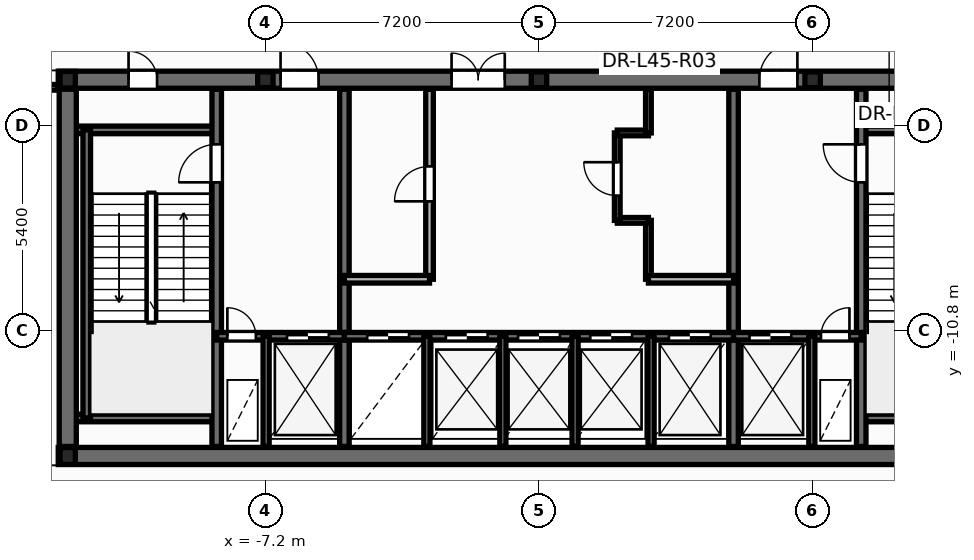
"""IFC4 building model, lengths in metres.
Left out: names, types, materials, properties, quantities, classifications, styles, units other than length and angle.
Written with IfcOpenShell. Run it as: python <this file> out.ifc"""

import sys

from ifc_helpers import new_model, si_unit, direction, frame, frame_2d, origin, origin_2d, place, context, subcontext, project, spatial, rectangle, i_section, extrude, element, fill, save


model = new_model("IFC4")
c1 = context("Model", 3, precision=1e-05, world=origin(), true_north=direction((0.0, 1.0)))
c2 = subcontext(c1, "Body", "Model", "MODEL_VIEW")
j1 = project(units=[si_unit("LENGTHUNIT", "METRE"), si_unit("PLANEANGLEUNIT", "RADIAN")], contexts=[c1])
p1 = place(None, origin())
s1 = spatial("IfcSite", under=j1, at=p1, CompositionType="ELEMENT")
p2 = place(p1, origin())
s2 = spatial("IfcBuilding", under=s1, at=p2, CompositionType="ELEMENT")
p3 = place(p2, frame((0.0, 0.0, 173.7)))
s3 = spatial("IfcBuildingStorey", under=s2, at=p3, CompositionType="ELEMENT", Elevation=173.7)
for number, where, z_axis, x_axis in (
    (1, (-12.4, -14.1, 0.0), (0.0, 0.0, 1.0), (1.0, 0.0, 0.0)),
    (2, (-12.4, -4.2, 0.0), (0.0, 0.0, 1.0), (1.0, 0.0, 0.0)),
):
    element("IfcColumn", number, at=place(p3, frame(where, z_axis=z_axis, x_axis=x_axis)), inside=s3, PredefinedType="COLUMN", context=c2, shape_type="SweptSolid", body=[
        extrude(i_section(OverallWidth=0.4, OverallDepth=0.44, WebThickness=0.028, FlangeThickness=0.04, at=origin_2d()), origin(), (0.0, 0.0, 1.0), 4.8),
    ])
for number, where, z_axis, x_axis in (
    (3, (-7.2, -4.2, 0.0), (0.0, 0.0, 1.0), (1.0, 0.0, 0.0)),
    (4, (0.0, -4.2, 0.0), (0.0, 0.0, 1.0), (1.0, 0.0, 0.0)),
    (5, (7.2, -4.2, 0.0), (0.0, 0.0, 1.0), (1.0, 0.0, 0.0)),
):
    element("IfcColumn", number, at=place(p3, frame(where, z_axis=z_axis, x_axis=x_axis)), inside=s3, PredefinedType="PILASTER", context=c2, shape_type="SweptSolid", body=[
        extrude(i_section(OverallWidth=0.405, OverallDepth=0.414, WebThickness=0.022, FlangeThickness=0.032, at=origin_2d()), origin(), (0.0, 0.0, 1.0), 4.8),
    ])
p4 = place(p3, frame((2.88, -9.45, 0.0), z_axis=(0.0, 0.0, 1.0), x_axis=(0.0, 1.0, 0.0)))
e6 = element("IfcWall", 6, at=p4, inside=s3, PredefinedType="PARTITIONING", context=c2, shape_type="SweptSolid", body=[
    extrude(rectangle(XDim=1.55, YDim=0.15, at=frame_2d((0.775, 0.0))), origin(), (0.0, 0.0, 1.0), 4.55),
])
p5 = place(p3, frame((2.06, -7.9, 0.0), z_axis=(0.0, 0.0, 1.0), x_axis=(1.0, 0.0, 0.0)))
e7 = element("IfcWall", 7, at=p5, inside=s3, PredefinedType="PARTITIONING", context=c2, shape_type="SweptSolid", body=[
    extrude(rectangle(XDim=0.82, YDim=0.15, at=frame_2d((0.41, 0.0))), origin(), (0.0, 0.0, 1.0), 4.55),
])
p6 = place(p3, frame((2.06, -7.9, 0.0), z_axis=(0.0, 0.0, 1.0), x_axis=(0.0, 1.0, 0.0)))
e8 = element("IfcWall", 8, at=p6, inside=s3, PredefinedType="PARTITIONING", context=c2, shape_type="SweptSolid", body=[
    extrude(rectangle(XDim=2.3, YDim=0.15, at=frame_2d((1.15, 0.0))), origin(), (0.0, 0.0, 1.0), 4.55),
])
p7 = place(p6, frame((0.65, 0.0, 0.0)))
e9 = element("IfcOpeningElement", 9, at=p7, cuts=e8, PredefinedType="OPENING", context=c2, shape_type="SweptSolid", body=[
    extrude(rectangle(XDim=0.886, YDim=2.104, at=frame_2d((0.44, 1.052))), frame((0.0, 0.085, 0.0), z_axis=(0.0, -1.0, 0.0), x_axis=(1.0, 0.0, 0.0)), (0.0, 0.0, 1.0), 0.17),
])
p8 = place(p3, frame((2.06, -5.6, 0.0), z_axis=(0.0, 0.0, 1.0), x_axis=(1.0, 0.0, 0.0)))
e10 = element("IfcWall", 10, at=p8, inside=s3, PredefinedType="PARTITIONING", context=c2, shape_type="SweptSolid", body=[
    extrude(rectangle(XDim=0.82, YDim=0.15, at=frame_2d((0.41, 0.0))), origin(), (0.0, 0.0, 1.0), 4.55),
])
p9 = place(p3, frame((2.88, -5.6, 0.0), z_axis=(0.0, 0.0, 1.0), x_axis=(0.0, 1.0, 0.0)))
e11 = element("IfcWall", 11, at=p9, inside=s3, PredefinedType="PARTITIONING", context=c2, shape_type="SweptSolid", body=[
    extrude(rectangle(XDim=1.15, YDim=0.15, at=frame_2d((0.575, 0.0))), origin(), (0.0, 0.0, 1.0), 4.55),
])
p10 = place(p3, frame((-12.65, -14.1, 0.0), z_axis=(0.0, 0.0, 1.0), x_axis=(1.0, 0.0, 0.0)))
e12 = element("IfcWall", 12, at=p10, inside=s3, PredefinedType="SHEAR", context=c2, shape_type="SweptSolid", body=[
    extrude(rectangle(XDim=25.3, YDim=0.45, at=frame_2d((12.65, 0.0))), origin(), (0.0, 0.0, 1.0), 4.8),
])
p11 = place(p3, frame((-12.65, -4.2, 0.0), z_axis=(0.0, 0.0, 1.0), x_axis=(1.0, 0.0, 0.0)))
e13 = element("IfcWall", 13, at=p11, inside=s3, PredefinedType="SHEAR", context=c2, shape_type="SweptSolid", body=[
    extrude(rectangle(XDim=25.3, YDim=0.45, at=frame_2d((12.65, 0.0))), origin(), (0.0, 0.0, 1.0), 4.8),
])
p12 = place(p11, frame((1.85, 0.0, 0.0)))
e14 = element("IfcOpeningElement", 14, at=p12, cuts=e13, PredefinedType="OPENING", context=c2, shape_type="SweptSolid", body=[
    extrude(rectangle(XDim=0.756, YDim=2.054, at=frame_2d((0.375, 1.027))), frame((0.0, 0.235, 0.0), z_axis=(0.0, -1.0, 0.0), x_axis=(1.0, 0.0, 0.0)), (0.0, 0.0, 1.0), 0.47),
])
p13 = place(p11, frame((22.65, 0.0, 0.0)))
e15 = element("IfcOpeningElement", 15, at=p13, cuts=e13, PredefinedType="OPENING", context=c2, shape_type="SweptSolid", body=[
    extrude(rectangle(XDim=0.756, YDim=2.054, at=frame_2d((0.375, 1.027))), frame((0.0, 0.235, 0.0), z_axis=(0.0, -1.0, 0.0), x_axis=(1.0, 0.0, 0.0)), (0.0, 0.0, 1.0), 0.47),
])
p14 = place(p11, frame((5.85, 0.0, 0.0)))
e16 = element("IfcOpeningElement", 16, at=p14, cuts=e13, PredefinedType="OPENING", context=c2, shape_type="SweptSolid", body=[
    extrude(rectangle(XDim=1.006, YDim=2.104, at=frame_2d((0.5, 1.052))), frame((0.0, 0.235, 0.0), z_axis=(0.0, -1.0, 0.0), x_axis=(1.0, 0.0, 0.0)), (0.0, 0.0, 1.0), 0.47),
])
p15 = place(p11, frame((10.35, 0.0, 0.0)))
e17 = element("IfcOpeningElement", 17, at=p15, cuts=e13, PredefinedType="OPENING", context=c2, shape_type="SweptSolid", body=[
    extrude(rectangle(XDim=1.406, YDim=2.154, at=frame_2d((0.7, 1.077))), frame((0.0, 0.235, 0.0), z_axis=(0.0, -1.0, 0.0), x_axis=(1.0, 0.0, 0.0)), (0.0, 0.0, 1.0), 0.47),
])
p16 = place(p11, frame((18.45, 0.0, 0.0)))
e18 = element("IfcOpeningElement", 18, at=p16, cuts=e13, PredefinedType="OPENING", context=c2, shape_type="SweptSolid", body=[
    extrude(rectangle(XDim=1.006, YDim=2.104, at=frame_2d((0.5, 1.052))), frame((0.0, 0.235, 0.0), z_axis=(0.0, -1.0, 0.0), x_axis=(1.0, 0.0, 0.0)), (0.0, 0.0, 1.0), 0.47),
])
for number, where, z_axis, x_axis in (
    (19, (-12.35, -5.52, 0.0), (0.0, 0.0, 1.0), (1.0, 0.0, 0.0)),
    (20, (-12.35, -13.1, 0.0), (0.0, 0.0, 1.0), (1.0, 0.0, 0.0)),
):
    element("IfcWall", number, at=place(p3, frame(where, z_axis=z_axis, x_axis=x_axis)), inside=s3, PredefinedType="SOLIDWALL", context=c2, shape_type="SweptSolid", body=[
        extrude(rectangle(XDim=3.87, YDim=0.2, at=frame_2d((1.935, 0.0))), origin(), (0.0, 0.0, 1.0), 4.8),
    ])
p17 = place(p3, frame((-11.9, -13.1, 0.0), z_axis=(0.0, 0.0, 1.0), x_axis=(0.0, 1.0, 0.0)))
e21 = element("IfcWall", 21, at=p17, inside=s3, PredefinedType="SOLIDWALL", context=c2, shape_type="SweptSolid", body=[
    extrude(rectangle(XDim=7.58, YDim=0.2, at=frame_2d((3.79, 0.0))), origin(), (0.0, 0.0, 1.0), 4.8),
])
for number, where, z_axis, x_axis in (
    (22, (8.48, -5.52, 0.0), (0.0, 0.0, 1.0), (1.0, 0.0, 0.0)),
    (23, (8.48, -13.1, 0.0), (0.0, 0.0, 1.0), (1.0, 0.0, 0.0)),
):
    element("IfcWall", number, at=place(p3, frame(where, z_axis=z_axis, x_axis=x_axis)), inside=s3, PredefinedType="SOLIDWALL", context=c2, shape_type="SweptSolid", body=[
        extrude(rectangle(XDim=3.87, YDim=0.2, at=frame_2d((1.935, 0.0))), origin(), (0.0, 0.0, 1.0), 4.8),
    ])
p18 = place(p3, frame((-8.48, -13.85, 0.0), z_axis=(0.0, 0.0, 1.0), x_axis=(0.0, 1.0, 0.0)))
e24 = element("IfcWall", 24, at=p18, inside=s3, PredefinedType="SHEAR", context=c2, shape_type="SweptSolid", body=[
    extrude(rectangle(XDim=9.4, YDim=0.25, at=frame_2d((4.7, 0.0))), origin(), (0.0, 0.0, 1.0), 4.8),
])
p19 = place(p18, frame((6.95, 0.0, 0.0)))
e25 = element("IfcOpeningElement", 25, at=p19, cuts=e24, PredefinedType="OPENING", context=c2, shape_type="SweptSolid", body=[
    extrude(rectangle(XDim=1.006, YDim=2.104, at=frame_2d((0.5, 1.052))), frame((0.0, 0.135, 0.0), z_axis=(0.0, -1.0, 0.0), x_axis=(1.0, 0.0, 0.0)), (0.0, 0.0, 1.0), 0.27),
])
p20 = place(p3, frame((8.48, -13.85, 0.0), z_axis=(0.0, 0.0, 1.0), x_axis=(0.0, 1.0, 0.0)))
e26 = element("IfcWall", 26, at=p20, inside=s3, PredefinedType="SHEAR", context=c2, shape_type="SweptSolid", body=[
    extrude(rectangle(XDim=9.4, YDim=0.25, at=frame_2d((4.7, 0.0))), origin(), (0.0, 0.0, 1.0), 4.8),
])
p21 = place(p20, frame((6.95, 0.0, 0.0)))
e27 = element("IfcOpeningElement", 27, at=p21, cuts=e26, PredefinedType="OPENING", context=c2, shape_type="SweptSolid", body=[
    extrude(rectangle(XDim=1.006, YDim=2.104, at=frame_2d((0.5, 1.052))), frame((0.0, 0.135, 0.0), z_axis=(0.0, -1.0, 0.0), x_axis=(1.0, 0.0, 0.0)), (0.0, 0.0, 1.0), 0.27),
])
for number, where, z_axis, x_axis in (
    (28, (-5.12, -13.85, 0.0), (0.0, 0.0, 1.0), (0.0, 1.0, 0.0)),
    (29, (5.12, -13.85, 0.0), (0.0, 0.0, 1.0), (0.0, 1.0, 0.0)),
):
    element("IfcWall", number, at=place(p3, frame(where, z_axis=z_axis, x_axis=x_axis)), inside=s3, PredefinedType="SHEAR", context=c2, shape_type="SweptSolid", body=[
        extrude(rectangle(XDim=9.4, YDim=0.25, at=frame_2d((4.7, 0.0))), origin(), (0.0, 0.0, 1.0), 4.8),
    ])
p22 = place(p3, frame((-8.48, -10.95, 0.0), z_axis=(0.0, 0.0, 1.0), x_axis=(1.0, 0.0, 0.0)))
e30 = element("IfcWall", 30, at=p22, inside=s3, PredefinedType="SOLIDWALL", context=c2, shape_type="SweptSolid", body=[
    extrude(rectangle(XDim=3.36, YDim=0.2, at=frame_2d((1.68, 0.0))), origin(), (0.0, 0.0, 1.0), 4.8),
])
p23 = place(p22, frame((0.28, 0.0, 0.0)))
e31 = element("IfcOpeningElement", 31, at=p23, cuts=e30, PredefinedType="OPENING", context=c2, shape_type="SweptSolid", body=[
    extrude(rectangle(XDim=0.756, YDim=2.054, at=frame_2d((0.375, 1.027))), frame((0.0, 0.11, 0.0), z_axis=(0.0, -1.0, 0.0), x_axis=(1.0, 0.0, 0.0)), (0.0, 0.0, 1.0), 0.22),
])
p24 = place(p22, frame((1.85, 0.0, 0.0)))
e32 = element("IfcOpeningElement", 32, at=p24, cuts=e30, PredefinedType="OPENING", context=c2, shape_type="SweptSolid", body=[
    extrude(rectangle(XDim=1.106, YDim=2.104, at=frame_2d((0.55, 1.052))), frame((0.0, 0.11, 0.0), z_axis=(0.0, -1.0, 0.0), x_axis=(1.0, 0.0, 0.0)), (0.0, 0.0, 1.0), 0.22),
])
p25 = place(p3, frame((-5.12, -10.95, 0.0), z_axis=(0.0, 0.0, 1.0), x_axis=(1.0, 0.0, 0.0)))
e33 = element("IfcWall", 33, at=p25, inside=s3, PredefinedType="SOLIDWALL", context=c2, shape_type="SweptSolid", body=[
    extrude(rectangle(XDim=10.24, YDim=0.2, at=frame_2d((5.12, 0.0))), origin(), (0.0, 0.0, 1.0), 4.8),
])
p26 = place(p25, frame((0.6, 0.0, 0.0)))
e34 = element("IfcOpeningElement", 34, at=p26, cuts=e33, PredefinedType="OPENING", context=c2, shape_type="SweptSolid", body=[
    extrude(rectangle(XDim=1.106, YDim=2.104, at=frame_2d((0.55, 1.052))), frame((0.0, 0.11, 0.0), z_axis=(0.0, -1.0, 0.0), x_axis=(1.0, 0.0, 0.0)), (0.0, 0.0, 1.0), 0.22),
])
p27 = place(p25, frame((2.67, 0.0, 0.0)))
e35 = element("IfcOpeningElement", 35, at=p27, cuts=e33, PredefinedType="OPENING", context=c2, shape_type="SweptSolid", body=[
    extrude(rectangle(XDim=1.106, YDim=2.104, at=frame_2d((0.55, 1.052))), frame((0.0, 0.11, 0.0), z_axis=(0.0, -1.0, 0.0), x_axis=(1.0, 0.0, 0.0)), (0.0, 0.0, 1.0), 0.22),
])
p28 = place(p25, frame((4.57, 0.0, 0.0)))
e36 = element("IfcOpeningElement", 36, at=p28, cuts=e33, PredefinedType="OPENING", context=c2, shape_type="SweptSolid", body=[
    extrude(rectangle(XDim=1.106, YDim=2.104, at=frame_2d((0.55, 1.052))), frame((0.0, 0.11, 0.0), z_axis=(0.0, -1.0, 0.0), x_axis=(1.0, 0.0, 0.0)), (0.0, 0.0, 1.0), 0.22),
])
p29 = place(p25, frame((6.47, 0.0, 0.0)))
e37 = element("IfcOpeningElement", 37, at=p29, cuts=e33, PredefinedType="OPENING", context=c2, shape_type="SweptSolid", body=[
    extrude(rectangle(XDim=1.106, YDim=2.104, at=frame_2d((0.55, 1.052))), frame((0.0, 0.11, 0.0), z_axis=(0.0, -1.0, 0.0), x_axis=(1.0, 0.0, 0.0)), (0.0, 0.0, 1.0), 0.22),
])
p30 = place(p25, frame((8.54, 0.0, 0.0)))
e38 = element("IfcOpeningElement", 38, at=p30, cuts=e33, PredefinedType="OPENING", context=c2, shape_type="SweptSolid", body=[
    extrude(rectangle(XDim=1.106, YDim=2.104, at=frame_2d((0.55, 1.052))), frame((0.0, 0.11, 0.0), z_axis=(0.0, -1.0, 0.0), x_axis=(1.0, 0.0, 0.0)), (0.0, 0.0, 1.0), 0.22),
])
p31 = place(p3, frame((5.12, -10.95, 0.0), z_axis=(0.0, 0.0, 1.0), x_axis=(1.0, 0.0, 0.0)))
e39 = element("IfcWall", 39, at=p31, inside=s3, PredefinedType="SOLIDWALL", context=c2, shape_type="SweptSolid", body=[
    extrude(rectangle(XDim=3.36, YDim=0.2, at=frame_2d((1.68, 0.0))), origin(), (0.0, 0.0, 1.0), 4.8),
])
p32 = place(p31, frame((0.42, 0.0, 0.0)))
e40 = element("IfcOpeningElement", 40, at=p32, cuts=e39, PredefinedType="OPENING", context=c2, shape_type="SweptSolid", body=[
    extrude(rectangle(XDim=1.106, YDim=2.104, at=frame_2d((0.55, 1.052))), frame((0.0, 0.11, 0.0), z_axis=(0.0, -1.0, 0.0), x_axis=(1.0, 0.0, 0.0)), (0.0, 0.0, 1.0), 0.22),
])
p33 = place(p31, frame((2.3, 0.0, 0.0)))
e41 = element("IfcOpeningElement", 41, at=p33, cuts=e39, PredefinedType="OPENING", context=c2, shape_type="SweptSolid", body=[
    extrude(rectangle(XDim=0.756, YDim=2.054, at=frame_2d((0.375, 1.027))), frame((0.0, 0.11, 0.0), z_axis=(0.0, -1.0, 0.0), x_axis=(1.0, 0.0, 0.0)), (0.0, 0.0, 1.0), 0.22),
])
for number, where, z_axis, x_axis in (
    (42, (-7.18, -13.85, 0.0), (0.0, 0.0, 1.0), (0.0, 1.0, 0.0)),
    (43, (7.18, -13.85, 0.0), (0.0, 0.0, 1.0), (0.0, 1.0, 0.0)),
    (44, (-2.95, -13.85, 0.0), (0.0, 0.0, 1.0), (0.0, 1.0, 0.0)),
    (45, (2.95, -13.85, 0.0), (0.0, 0.0, 1.0), (0.0, 1.0, 0.0)),
):
    element("IfcWall", number, at=place(p3, frame(where, z_axis=z_axis, x_axis=x_axis)), inside=s3, PredefinedType="PARTITIONING", context=c2, shape_type="SweptSolid", body=[
        extrude(rectangle(XDim=2.9, YDim=0.16, at=frame_2d((1.45, 0.0))), origin(), (0.0, 0.0, 1.0), 3.675),
    ])
p34 = place(p3, frame((-12.4, -13.85, 0.0), z_axis=(0.0, 0.0, 1.0), x_axis=(0.0, 1.0, 0.0)))
e46 = element("IfcWall", 46, at=p34, inside=s3, PredefinedType="SHEAR", context=c2, shape_type="SweptSolid", body=[
    extrude(rectangle(XDim=9.4, YDim=0.45, at=frame_2d((4.7, 0.0))), origin(), (0.0, 0.0, 1.0), 4.8),
])
p35 = place(p3, frame((-2.88, -9.45, 0.0), z_axis=(0.0, 0.0, 1.0), x_axis=(0.0, 1.0, 0.0)))
e47 = element("IfcWall", 47, at=p35, inside=s3, PredefinedType="SOLIDWALL", context=c2, shape_type="SweptSolid", body=[
    extrude(rectangle(XDim=5.0, YDim=0.2, at=frame_2d((2.5, 0.0))), origin(), (0.0, 0.0, 1.0), 4.55),
])
p36 = place(p35, frame((2.05, 0.0, 0.0)))
e48 = element("IfcOpeningElement", 48, at=p36, cuts=e47, PredefinedType="OPENING", context=c2, shape_type="SweptSolid", body=[
    extrude(rectangle(XDim=0.926, YDim=2.104, at=frame_2d((0.46, 1.052))), frame((0.0, 0.11, 0.0), z_axis=(0.0, -1.0, 0.0), x_axis=(1.0, 0.0, 0.0)), (0.0, 0.0, 1.0), 0.22),
])
for number, where, z_axis, x_axis in (
    (49, (-5.12, -9.45, 0.0), (0.0, 0.0, 1.0), (1.0, 0.0, 0.0)),
    (50, (2.88, -9.45, 0.0), (0.0, 0.0, 1.0), (1.0, 0.0, 0.0)),
):
    element("IfcWall", number, at=place(p3, frame(where, z_axis=z_axis, x_axis=x_axis)), inside=s3, PredefinedType="SOLIDWALL", context=c2, shape_type="SweptSolid", body=[
        extrude(rectangle(XDim=2.24, YDim=0.2, at=frame_2d((1.12, 0.0))), origin(), (0.0, 0.0, 1.0), 4.55),
    ])
for number, where, z_axis, x_axis in (
    (51, (-0.95, -13.85, 0.0), (0.0, 0.0, 1.0), (0.0, 1.0, 0.0)),
    (52, (0.95, -13.85, 0.0), (0.0, 0.0, 1.0), (0.0, 1.0, 0.0)),
):
    element("IfcWall", number, at=place(p3, frame(where, z_axis=z_axis, x_axis=x_axis)), inside=s3, PredefinedType="PARTITIONING", context=c2, shape_type="SweptSolid", body=[
        extrude(rectangle(XDim=2.9, YDim=0.16, at=frame_2d((1.45, 0.0))), origin(), (0.0, 0.0, 1.0), 3.675),
    ])
p37 = place(p3, frame((-15.2, -4.4, 0.0), z_axis=(0.0, 0.0, 1.0), x_axis=(1.0, 0.0, 0.0)))
e53 = element("IfcWall", 53, at=p37, inside=s3, PredefinedType="PARTITIONING", context=c2, shape_type="SweptSolid", body=[
    extrude(rectangle(XDim=2.548, YDim=0.15, at=frame_2d((1.274, 0.0))), origin(), (0.0, 0.0, 1.0), 3.525),
])
p38 = place(p37, frame((0.36, 0.0, 0.0)))
e54 = element("IfcOpeningElement", 54, at=p38, cuts=e53, PredefinedType="OPENING", context=c2, shape_type="SweptSolid", body=[
    extrude(rectangle(XDim=0.906, YDim=2.104, at=frame_2d((0.45, 1.052))), frame((0.0, 0.085, 0.0), z_axis=(0.0, -1.0, 0.0), x_axis=(1.0, 0.0, 0.0)), (0.0, 0.0, 1.0), 0.17),
])
p39 = place(p36, origin())
e55 = element("IfcDoor", 55, at=p39, inside=s3, OperationType="SINGLE_SWING_LEFT", PredefinedType="DOOR", context=c2, shape_type="SweptSolid", body=[
    extrude(rectangle(XDim=0.92, YDim=2.1, at=frame_2d((0.46, 1.05))), frame((0.0, 0.025, 0.0), z_axis=(0.0, -1.0, 0.0), x_axis=(1.0, 0.0, 0.0)), (0.0, 0.0, 1.0), 0.05),
])
fill(e48, e55)
p40 = place(p7, origin())
e56 = element("IfcDoor", 56, at=p40, inside=s3, OperationType="SINGLE_SWING_RIGHT", PredefinedType="DOOR", context=c2, shape_type="SweptSolid", body=[
    extrude(rectangle(XDim=0.88, YDim=2.1, at=frame_2d((0.44, 1.05))), frame((0.0, 0.025, 0.0), z_axis=(0.0, -1.0, 0.0), x_axis=(1.0, 0.0, 0.0)), (0.0, 0.0, 1.0), 0.05),
])
fill(e9, e56)
p41 = place(p19, origin())
e57 = element("IfcDoor", 57, at=p41, inside=s3, OperationType="SINGLE_SWING_LEFT", PredefinedType="DOOR", context=c2, shape_type="SweptSolid", body=[
    extrude(rectangle(XDim=1.0, YDim=2.1, at=frame_2d((0.5, 1.05))), frame((0.0, 0.025, 0.0), z_axis=(0.0, -1.0, 0.0), x_axis=(1.0, 0.0, 0.0)), (0.0, 0.0, 1.0), 0.05),
])
fill(e25, e57)
p42 = place(p21, origin())
e58 = element("IfcDoor", 58, at=p42, inside=s3, OperationType="SINGLE_SWING_RIGHT", PredefinedType="DOOR", context=c2, shape_type="SweptSolid", body=[
    extrude(rectangle(XDim=1.0, YDim=2.1, at=frame_2d((0.5, 1.05))), frame((0.0, 0.025, 0.0), z_axis=(0.0, -1.0, 0.0), x_axis=(1.0, 0.0, 0.0)), (0.0, 0.0, 1.0), 0.05),
])
fill(e27, e58)
p43 = place(p23, origin())
e59 = element("IfcDoor", 59, at=p43, inside=s3, OperationType="SINGLE_SWING_LEFT", PredefinedType="DOOR", context=c2, shape_type="SweptSolid", body=[
    extrude(rectangle(XDim=0.75, YDim=2.05, at=frame_2d((0.375, 1.025))), frame((0.0, 0.025, 0.0), z_axis=(0.0, -1.0, 0.0), x_axis=(1.0, 0.0, 0.0)), (0.0, 0.0, 1.0), 0.05),
])
fill(e31, e59)
p44 = place(p24, origin())
e60 = element("IfcDoor", 60, at=p44, inside=s3, OperationType="DOUBLE_DOOR_SLIDING", PredefinedType="DOOR", context=c2, shape_type="SweptSolid", body=[
    extrude(rectangle(XDim=1.1, YDim=2.1, at=frame_2d((0.55, 1.05))), frame((0.0, 0.025, 0.0), z_axis=(0.0, -1.0, 0.0), x_axis=(1.0, 0.0, 0.0)), (0.0, 0.0, 1.0), 0.05),
])
fill(e32, e60)
p45 = place(p32, origin())
e61 = element("IfcDoor", 61, at=p45, inside=s3, OperationType="DOUBLE_DOOR_SLIDING", PredefinedType="DOOR", context=c2, shape_type="SweptSolid", body=[
    extrude(rectangle(XDim=1.1, YDim=2.1, at=frame_2d((0.55, 1.05))), frame((0.0, 0.025, 0.0), z_axis=(0.0, -1.0, 0.0), x_axis=(1.0, 0.0, 0.0)), (0.0, 0.0, 1.0), 0.05),
])
fill(e40, e61)
p46 = place(p33, origin())
e62 = element("IfcDoor", 62, at=p46, inside=s3, OperationType="SINGLE_SWING_RIGHT", PredefinedType="DOOR", context=c2, shape_type="SweptSolid", body=[
    extrude(rectangle(XDim=0.75, YDim=2.05, at=frame_2d((0.375, 1.025))), frame((0.0, 0.025, 0.0), z_axis=(0.0, -1.0, 0.0), x_axis=(1.0, 0.0, 0.0)), (0.0, 0.0, 1.0), 0.05),
])
fill(e41, e62)
p47 = place(p26, origin())
e63 = element("IfcDoor", 63, at=p47, inside=s3, OperationType="DOUBLE_DOOR_SLIDING", PredefinedType="DOOR", context=c2, shape_type="SweptSolid", body=[
    extrude(rectangle(XDim=1.1, YDim=2.1, at=frame_2d((0.55, 1.05))), frame((0.0, 0.025, 0.0), z_axis=(0.0, -1.0, 0.0), x_axis=(1.0, 0.0, 0.0)), (0.0, 0.0, 1.0), 0.05),
])
fill(e34, e63)
p48 = place(p27, origin())
e64 = element("IfcDoor", 64, at=p48, inside=s3, OperationType="DOUBLE_DOOR_SLIDING", PredefinedType="DOOR", context=c2, shape_type="SweptSolid", body=[
    extrude(rectangle(XDim=1.1, YDim=2.1, at=frame_2d((0.55, 1.05))), frame((0.0, 0.025, 0.0), z_axis=(0.0, -1.0, 0.0), x_axis=(1.0, 0.0, 0.0)), (0.0, 0.0, 1.0), 0.05),
])
fill(e35, e64)
p49 = place(p28, origin())
e65 = element("IfcDoor", 65, at=p49, inside=s3, OperationType="DOUBLE_DOOR_SLIDING", PredefinedType="DOOR", context=c2, shape_type="SweptSolid", body=[
    extrude(rectangle(XDim=1.1, YDim=2.1, at=frame_2d((0.55, 1.05))), frame((0.0, 0.025, 0.0), z_axis=(0.0, -1.0, 0.0), x_axis=(1.0, 0.0, 0.0)), (0.0, 0.0, 1.0), 0.05),
])
fill(e36, e65)
p50 = place(p29, origin())
e66 = element("IfcDoor", 66, at=p50, inside=s3, OperationType="DOUBLE_DOOR_SLIDING", PredefinedType="DOOR", context=c2, shape_type="SweptSolid", body=[
    extrude(rectangle(XDim=1.1, YDim=2.1, at=frame_2d((0.55, 1.05))), frame((0.0, 0.025, 0.0), z_axis=(0.0, -1.0, 0.0), x_axis=(1.0, 0.0, 0.0)), (0.0, 0.0, 1.0), 0.05),
])
fill(e37, e66)
p51 = place(p30, origin())
e67 = element("IfcDoor", 67, at=p51, inside=s3, OperationType="DOUBLE_DOOR_SLIDING", PredefinedType="DOOR", context=c2, shape_type="SweptSolid", body=[
    extrude(rectangle(XDim=1.1, YDim=2.1, at=frame_2d((0.55, 1.05))), frame((0.0, 0.025, 0.0), z_axis=(0.0, -1.0, 0.0), x_axis=(1.0, 0.0, 0.0)), (0.0, 0.0, 1.0), 0.05),
])
fill(e38, e67)
p52 = place(p12, origin())
e68 = element("IfcDoor", 68, at=p52, inside=s3, OperationType="SINGLE_SWING_LEFT", PredefinedType="DOOR", context=c2, shape_type="SweptSolid", body=[
    extrude(rectangle(XDim=0.75, YDim=2.05, at=frame_2d((0.375, 1.025))), frame((0.0, 0.025, 0.0), z_axis=(0.0, -1.0, 0.0), x_axis=(1.0, 0.0, 0.0)), (0.0, 0.0, 1.0), 0.05),
])
fill(e14, e68)
p53 = place(p14, origin())
e69 = element("IfcDoor", 69, at=p53, inside=s3, OperationType="SINGLE_SWING_LEFT", PredefinedType="DOOR", context=c2, shape_type="SweptSolid", body=[
    extrude(rectangle(XDim=1.0, YDim=2.1, at=frame_2d((0.5, 1.05))), frame((0.0, 0.025, 0.0), z_axis=(0.0, -1.0, 0.0), x_axis=(1.0, 0.0, 0.0)), (0.0, 0.0, 1.0), 0.05),
])
fill(e16, e69)
p54 = place(p15, origin())
e70 = element("IfcDoor", 70, at=p54, inside=s3, OperationType="DOUBLE_DOOR_SINGLE_SWING", PredefinedType="DOOR", context=c2, shape_type="SweptSolid", body=[
    extrude(rectangle(XDim=1.4, YDim=2.15, at=frame_2d((0.7, 1.075))), frame((0.0, 0.025, 0.0), z_axis=(0.0, -1.0, 0.0), x_axis=(1.0, 0.0, 0.0)), (0.0, 0.0, 1.0), 0.05),
])
fill(e17, e70)
p55 = place(p16, origin())
e71 = element("IfcDoor", 71, at=p55, inside=s3, OperationType="SINGLE_SWING_RIGHT", PredefinedType="DOOR", context=c2, shape_type="SweptSolid", body=[
    extrude(rectangle(XDim=1.0, YDim=2.1, at=frame_2d((0.5, 1.05))), frame((0.0, 0.025, 0.0), z_axis=(0.0, -1.0, 0.0), x_axis=(1.0, 0.0, 0.0)), (0.0, 0.0, 1.0), 0.05),
])
fill(e18, e71)
save(model, sys.argv[1])
